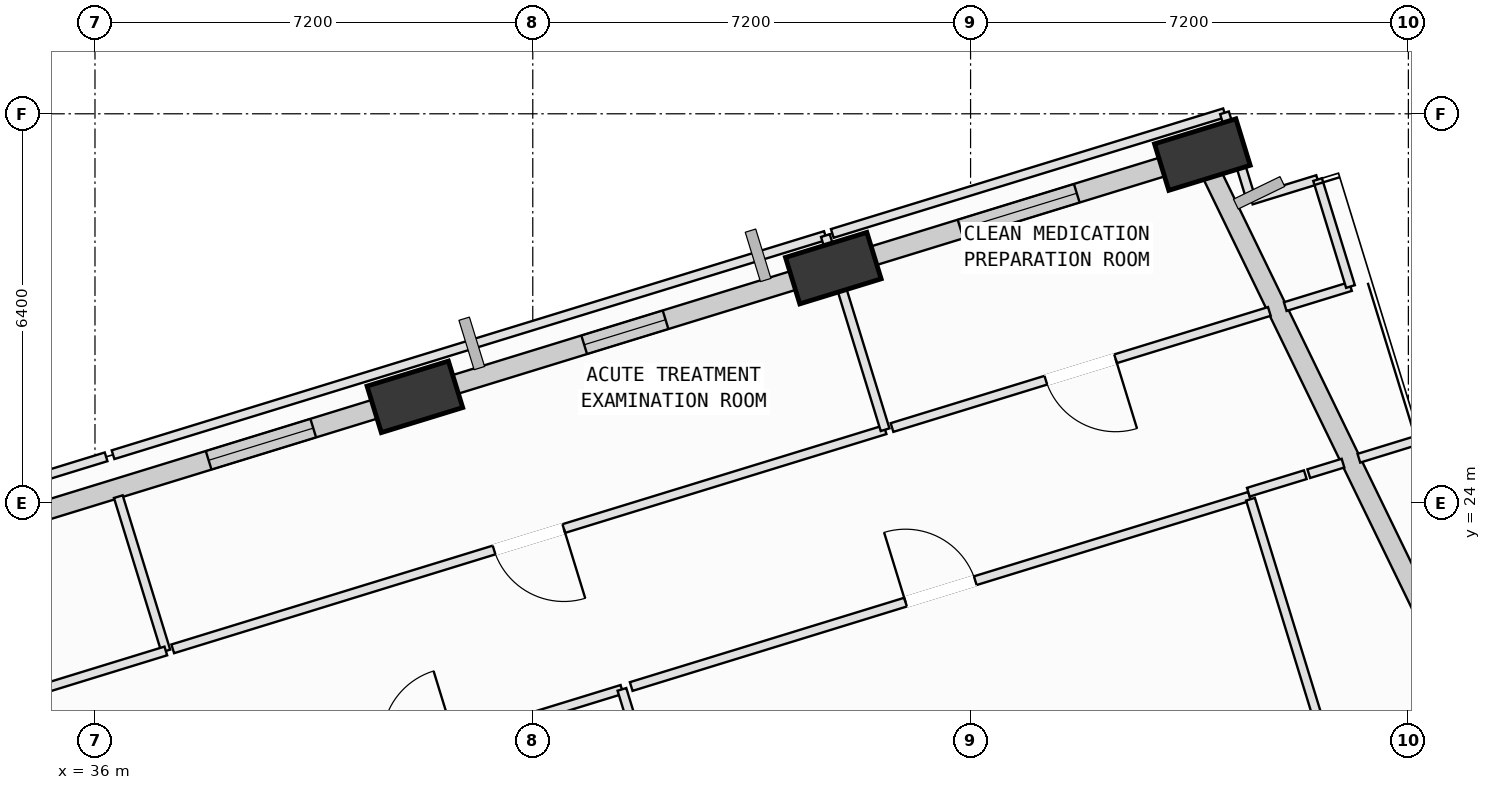
"""IFC4 building model, lengths in metres.
Left out: names, types, materials, properties, quantities, classifications, styles, units other than length and angle.
Written with IfcOpenShell. Run it as: python <this file> out.ifc"""

import sys

from ifc_helpers import new_model, si_unit, direction, frame, frame_2d, origin, origin_2d, place, context, subcontext, project, spatial, rectangle, extrude, element, fill, save


model = new_model("IFC4")
c1 = context("Model", 3, precision=1e-05, world=origin(), true_north=direction((0.0, 1.0)))
c2 = subcontext(c1, "Body", "Model", "MODEL_VIEW")
j1 = project(units=[si_unit("LENGTHUNIT", "METRE"), si_unit("PLANEANGLEUNIT", "RADIAN")], contexts=[c1])
p1 = place(None, origin())
s1 = spatial("IfcSite", under=j1, at=p1, CompositionType="ELEMENT")
p2 = place(p1, origin())
s2 = spatial("IfcBuilding", under=s1, at=p2, CompositionType="ELEMENT")
p3 = place(p2, frame((0.0, 0.0, 96.4)))
s3 = spatial("IfcBuildingStorey", under=s2, at=p3, CompositionType="ELEMENT", Elevation=96.4)
p4 = place(p3, frame((54.212, 29.729, 0.002), z_axis=(-0.021056394497, 0.084955857564, 0.996162200907), x_axis=(-0.857256251173, -0.514246403244, 0.025736289084)))
e1 = element("IfcColumn", 1, at=p4, inside=s3, PredefinedType="COLUMN", context=c2, shape_type="SweptSolid", body=[
    extrude(rectangle(XDim=1.4, YDim=0.8, at=origin_2d()), origin(), (0.0, 0.0, 1.0), 4.012),
])
p5 = place(p3, frame((48.143, 27.862, 0.002), z_axis=(-0.013170706194, 0.060060859267, 0.998107822674), x_axis=(-0.870744822712, -0.491402654713, 0.018079951933)))
e2 = element("IfcColumn", 2, at=p5, inside=s3, PredefinedType="COLUMN", context=c2, shape_type="SweptSolid", body=[
    extrude(rectangle(XDim=1.4, YDim=0.8, at=origin_2d()), origin(), (0.0, 0.0, 1.0), 4.004),
])
p6 = place(p3, frame((41.261, 25.744, 0.002), z_axis=(-0.004152063563, 0.031751074307, 0.999487183334), x_axis=(-0.909616782217, -0.415341613955, 0.009415584218)))
e3 = element("IfcColumn", 3, at=p6, inside=s3, PredefinedType="COLUMN", context=c2, shape_type="SweptSolid", body=[
    extrude(rectangle(XDim=1.4, YDim=0.8, at=origin_2d()), origin(), (0.0, 0.0, 1.0), 3.998),
])
p7 = place(p3, frame((54.353, 29.438, 0.0), z_axis=(0.0, 0.0, 1.0), x_axis=(0.436640831381, -0.899635917675, 0.0)))
e4 = element("IfcWall", 4, at=p7, inside=s3, PredefinedType="SOLIDWALL", context=c2, shape_type="SweptSolid", body=[
    extrude(rectangle(XDim=8.838, YDim=0.32, at=frame_2d((4.419, 0.0))), origin(), (0.0, 0.0, 1.0), 3.165),
])
p8 = place(p3, frame((48.612, 28.006, 0.0), z_axis=(0.0, 0.0, 1.0), x_axis=(0.955793658596, 0.294038232527, 0.0)))
e5 = element("IfcWall", 5, at=p8, inside=s3, PredefinedType="SOLIDWALL", context=c2, shape_type="SweptSolid", body=[
    extrude(rectangle(XDim=5.405, YDim=0.32, at=frame_2d((2.702, 0.0))), origin(), (0.0, 0.0, 1.0), 2.945),
])
p9 = place(p8, frame((1.698, 0.0, 0.75)))
e6 = element("IfcOpeningElement", 6, at=p9, cuts=e5, PredefinedType="OPENING", context=c2, shape_type="SweptSolid", body=[
    extrude(rectangle(XDim=2.0, YDim=1.95, at=frame_2d((1.0, 0.975))), frame((0.0, 0.17, 0.0), z_axis=(0.0, -1.0, 0.0), x_axis=(1.0, 0.0, 0.0)), (0.0, 0.0, 1.0), 0.34),
])
p10 = place(p3, frame((41.742, 25.892, 0.0), z_axis=(0.0, 0.0, 1.0), x_axis=(0.955782399792, 0.294074827635, 0.0)))
e7 = element("IfcWall", 7, at=p10, inside=s3, PredefinedType="SOLIDWALL", context=c2, shape_type="SweptSolid", body=[
    extrude(rectangle(XDim=6.227, YDim=0.32, at=frame_2d((3.113, 0.0))), origin(), (0.0, 0.0, 1.0), 3.145),
])
p11 = place(p10, frame((2.41, 0.0, 0.75)))
e8 = element("IfcOpeningElement", 8, at=p11, cuts=e7, PredefinedType="OPENING", context=c2, shape_type="SweptSolid", body=[
    extrude(rectangle(XDim=1.4, YDim=1.85, at=frame_2d((0.7, 0.925))), frame((0.0, 0.17, 0.0), z_axis=(0.0, -1.0, 0.0), x_axis=(1.0, 0.0, 0.0)), (0.0, 0.0, 1.0), 0.34),
])
p12 = place(p3, frame((34.864, 23.777, 0.0), z_axis=(0.0, 0.0, 1.0), x_axis=(0.955799403791, 0.294019556685, 0.0)))
e9 = element("IfcWall", 9, at=p12, inside=s3, PredefinedType="SOLIDWALL", context=c2, shape_type="SweptSolid", body=[
    extrude(rectangle(XDim=6.211, YDim=0.32, at=frame_2d((3.105, 0.0))), origin(), (0.0, 0.0, 1.0), 3.165),
])
p13 = place(p12, frame((3.144, 0.0, 0.75)))
e10 = element("IfcOpeningElement", 10, at=p13, cuts=e9, PredefinedType="OPENING", context=c2, shape_type="SweptSolid", body=[
    extrude(rectangle(XDim=1.8, YDim=2.05, at=frame_2d((0.9, 1.025))), frame((0.0, 0.17, 0.0), z_axis=(0.0, -1.0, 0.0), x_axis=(1.0, 0.0, 0.0)), (0.0, 0.0, 1.0), 0.34),
])
p14 = place(p3, frame((38.03, 18.891, 0.0), z_axis=(0.0, 0.0, 1.0), x_axis=(0.955772926222, 0.294105616236, 0.0)))
e11 = element("IfcWall", 11, at=p14, inside=s3, PredefinedType="PARTITIONING", context=c2, shape_type="SweptSolid", body=[
    extrude(rectangle(XDim=6.943, YDim=0.15, at=frame_2d((3.472, 0.0))), origin(), (0.0, 0.0, 1.0), 2.945),
])
p15 = place(p14, frame((2.872, 0.0, 0.0)))
e12 = element("IfcOpeningElement", 12, at=p15, cuts=e11, PredefinedType="OPENING", context=c2, shape_type="SweptSolid", body=[
    extrude(rectangle(XDim=1.2, YDim=2.15, at=frame_2d((0.6, 1.075))), frame((0.0, 0.085, 0.0), z_axis=(0.0, -1.0, 0.0), x_axis=(1.0, 0.0, 0.0)), (0.0, 0.0, 1.0), 0.17),
])
p16 = place(p3, frame((44.666, 20.933, 0.0), z_axis=(0.0, 0.0, 1.0), x_axis=(0.294050797953, -0.955789792906, 0.0)))
e13 = element("IfcWall", 13, at=p16, inside=s3, PredefinedType="PARTITIONING", context=c2, shape_type="SweptSolid", body=[
    extrude(rectangle(XDim=13.215, YDim=0.15, at=frame_2d((6.608, 0.0))), origin(), (0.0, 0.0, 1.0), 3.78),
])
p17 = place(p3, frame((44.819, 20.98, 0.0), z_axis=(0.0, 0.0, 1.0), x_axis=(0.955786946021, 0.294060051378, 0.0)))
e14 = element("IfcWall", 14, at=p17, inside=s3, PredefinedType="PARTITIONING", context=c2, shape_type="SweptSolid", body=[
    extrude(rectangle(XDim=10.64, YDim=0.15, at=frame_2d((5.32, 0.0))), origin(), (0.0, 0.0, 1.0), 3.78),
])
p18 = place(p17, frame((4.72, 0.0, 0.0)))
e15 = element("IfcOpeningElement", 15, at=p18, cuts=e14, PredefinedType="OPENING", context=c2, shape_type="SweptSolid", body=[
    extrude(rectangle(XDim=1.2, YDim=2.15, at=frame_2d((0.6, 1.075))), frame((0.0, 0.085, 0.0), z_axis=(0.0, -1.0, 0.0), x_axis=(1.0, 0.0, 0.0)), (0.0, 0.0, 1.0), 0.17),
])
p19 = place(p3, frame((55.004, 24.061, 0.0), z_axis=(0.0, 0.0, 1.0), x_axis=(0.294018711163, -0.955799663887, 0.0)))
e16 = element("IfcWall", 16, at=p19, inside=s3, PredefinedType="PARTITIONING", context=c2, shape_type="SweptSolid", body=[
    extrude(rectangle(XDim=13.799, YDim=0.15, at=frame_2d((6.899, 0.0))), origin(), (0.0, 0.0, 1.0), 3.78),
])
p20 = place(p3, frame((36.384, 24.103, 0.0), z_axis=(0.0, 0.0, 1.0), x_axis=(0.294105230009, -0.955773045069, 0.0)))
e17 = element("IfcWall", 17, at=p20, inside=s3, PredefinedType="PARTITIONING", context=c2, shape_type="SweptSolid", body=[
    extrude(rectangle(XDim=2.656, YDim=0.15, at=frame_2d((1.328, 0.0))), origin(), (0.0, 0.0, 1.0), 3.78),
])
p21 = place(p3, frame((37.165, 21.565, 0.0), z_axis=(0.0, 0.0, 1.0), x_axis=(-0.955838846993, -0.293891304022, 0.0)))
e18 = element("IfcWall", 18, at=p21, inside=s3, PredefinedType="PARTITIONING", context=c2, shape_type="SweptSolid", body=[
    extrude(rectangle(XDim=3.351, YDim=0.15, at=frame_2d((1.676, 0.0))), origin(), (0.0, 0.0, 1.0), 3.78),
])
p22 = place(p3, frame((28.1, 22.271, 0.0), z_axis=(0.0, 0.0, 1.0), x_axis=(0.955779632904, 0.294083820237, 0.0)))
e19 = element("IfcWall", 19, at=p22, inside=s3, PredefinedType="PARTITIONING", context=c2, shape_type="SweptSolid", body=[
    extrude(rectangle(XDim=8.457, YDim=0.15, at=frame_2d((4.229, 0.0))), origin(), (0.0, 0.0, 1.0), 3.78),
])
p23 = place(p3, frame((48.994, 25.204, 0.0), z_axis=(0.0, 0.0, 1.0), x_axis=(-0.955791928213, -0.294043857208, 0.0)))
e20 = element("IfcWall", 20, at=p23, inside=s3, PredefinedType="PARTITIONING", context=c2, shape_type="SweptSolid", body=[
    extrude(rectangle(XDim=12.257, YDim=0.15, at=frame_2d((6.128, 0.0))), origin(), (0.0, 0.0, 1.0), 2.945),
])
p24 = place(p23, frame((5.528, 0.0, 0.0)))
e21 = element("IfcOpeningElement", 21, at=p24, cuts=e20, PredefinedType="OPENING", context=c2, shape_type="SweptSolid", body=[
    extrude(rectangle(XDim=1.2, YDim=2.15, at=frame_2d((0.6, 1.075))), frame((0.0, 0.085, 0.0), z_axis=(0.0, -1.0, 0.0), x_axis=(1.0, 0.0, 0.0)), (0.0, 0.0, 1.0), 0.17),
])
p25 = place(p3, frame((36.297, 24.793, 0.0), z_axis=(0.0, 0.0, 1.0), x_axis=(0.955791928213, 0.294043857208, 0.0)))
e22 = element("IfcWall", 22, at=p25, inside=s3, PredefinedType="PARTITIONING", context=c2, shape_type="SweptSolid", body=[
    extrude(rectangle(XDim=12.257, YDim=0.15, at=frame_2d((6.128, 0.0))), origin(), (0.0, 0.0, 1.0), 3.145),
])
p26 = place(p3, frame((48.012, 28.397, 0.0), z_axis=(0.0, 0.0, 1.0), x_axis=(0.293952315678, -0.955820085637, 0.0)))
e23 = element("IfcWall", 23, at=p26, inside=s3, PredefinedType="PARTITIONING", context=c2, shape_type="SweptSolid", body=[
    extrude(rectangle(XDim=3.34, YDim=0.15, at=frame_2d((1.67, 0.0))), origin(), (0.0, 0.0, 1.0), 3.78),
])
p27 = place(p3, frame((56.648, 27.559, 0.0), z_axis=(0.0, 0.0, 1.0), x_axis=(-0.955797815321, -0.294024720436, 0.0)))
e24 = element("IfcWall", 24, at=p27, inside=s3, PredefinedType="PARTITIONING", context=c2, shape_type="SweptSolid", body=[
    extrude(rectangle(XDim=1.123, YDim=0.15, at=frame_2d((0.561, 0.0))), origin(), (0.0, 0.0, 1.0), 3.78),
])
p28 = place(p3, frame((55.314, 27.149, 0.0), z_axis=(0.0, 0.0, 1.0), x_axis=(-0.955805833241, -0.293998655001, 0.0)))
e25 = element("IfcWall", 25, at=p28, inside=s3, PredefinedType="PARTITIONING", context=c2, shape_type="SweptSolid", body=[
    extrude(rectangle(XDim=6.493, YDim=0.15, at=frame_2d((3.247, 0.0))), origin(), (0.0, 0.0, 1.0), 3.78),
])
p29 = place(p28, frame((2.646, 0.0, 0.0)))
e26 = element("IfcOpeningElement", 26, at=p29, cuts=e25, PredefinedType="OPENING", context=c2, shape_type="SweptSolid", body=[
    extrude(rectangle(XDim=1.2, YDim=2.15, at=frame_2d((0.6, 1.075))), frame((0.0, 0.085, 0.0), z_axis=(0.0, -1.0, 0.0), x_axis=(1.0, 0.0, 0.0)), (0.0, 0.0, 1.0), 0.17),
])
p30 = place(p3, frame((48.126, 28.432, 0.0), z_axis=(0.0, 0.0, 1.0), x_axis=(0.95579856253, 0.294022291445, 0.0)))
e27 = element("IfcWall", 27, at=p30, inside=s3, PredefinedType="PARTITIONING", context=c2, shape_type="SweptSolid", body=[
    extrude(rectangle(XDim=6.748, YDim=0.15, at=frame_2d((3.374, 0.0))), origin(), (0.0, 0.0, 1.0), 2.945),
])
p31 = place(p3, frame((54.576, 30.416, 0.0), z_axis=(0.0, 0.0, 1.0), x_axis=(0.294028677657, -0.955796597983, 0.0)))
e28 = element("IfcWall", 28, at=p31, inside=s3, PredefinedType="PARTITIONING", context=c2, shape_type="SweptSolid", body=[
    extrude(rectangle(XDim=1.5, YDim=0.15, at=frame_2d((0.75, 0.0))), origin(), (0.0, 0.0, 1.0), 3.165),
])
p32 = place(p3, frame((55.017, 28.982, 0.0), z_axis=(0.0, 0.0, 1.0), x_axis=(0.955570492983, 0.294762672231, 0.0)))
e29 = element("IfcWall", 29, at=p32, inside=s3, PredefinedType="PARTITIONING", context=c2, shape_type="SweptSolid", body=[
    extrude(rectangle(XDim=1.141, YDim=0.15, at=frame_2d((0.57, 0.0))), origin(), (0.0, 0.0, 1.0), 3.78),
])
p33 = place(p3, frame((56.107, 29.318, 0.0), z_axis=(0.0, 0.0, 1.0), x_axis=(0.293973982394, -0.955813422, 0.0)))
e30 = element("IfcWall", 30, at=p33, inside=s3, PredefinedType="PARTITIONING", context=c2, shape_type="SweptSolid", body=[
    extrude(rectangle(XDim=1.84, YDim=0.15, at=frame_2d((0.92, 0.0))), origin(), (0.0, 0.0, 1.0), 3.78),
])
p34 = place(p3, frame((54.968, 24.176, 0.0), z_axis=(0.0, 0.0, 1.0), x_axis=(0.955843603332, 0.293875834271, 0.0)))
e31 = element("IfcWall", 31, at=p34, inside=s3, PredefinedType="PARTITIONING", context=c2, shape_type="SweptSolid", body=[
    extrude(rectangle(XDim=0.98, YDim=0.15, at=frame_2d((0.49, 0.0))), origin(), (0.0, 0.0, 1.0), 3.78),
])
p35 = place(p3, frame((55.962, 24.481, 0.0), z_axis=(0.0, 0.0, 1.0), x_axis=(0.95584172242, 0.29388195195, 0.0)))
e32 = element("IfcWall", 32, at=p35, inside=s3, PredefinedType="PARTITIONING", context=c2, shape_type="SweptSolid", body=[
    extrude(rectangle(XDim=0.589, YDim=0.15, at=frame_2d((0.294, 0.0))), origin(), (0.0, 0.0, 1.0), 3.78),
])
p36 = place(p3, frame((56.786, 24.735, 0.0), z_axis=(0.0, 0.0, 1.0), x_axis=(0.955873764291, 0.293777716548, 0.0)))
e33 = element("IfcWall", 33, at=p36, inside=s3, PredefinedType="PARTITIONING", context=c2, shape_type="SweptSolid", body=[
    extrude(rectangle(XDim=1.058, YDim=0.15, at=frame_2d((0.529, 0.0))), origin(), (0.0, 0.0, 1.0), 3.78),
])
p37 = place(p9, origin())
e34 = element("IfcWindow", 34, at=p37, inside=s3, PartitioningType="SINGLE_PANEL", PredefinedType="WINDOW", context=c2, shape_type="SweptSolid", body=[
    extrude(rectangle(XDim=2.0, YDim=1.95, at=frame_2d((1.0, 0.975))), frame((0.0, 0.03, 0.0), z_axis=(0.0, -1.0, 0.0), x_axis=(1.0, 0.0, 0.0)), (0.0, 0.0, 1.0), 0.06),
])
fill(e6, e34)
p38 = place(p11, origin())
e35 = element("IfcWindow", 35, at=p38, inside=s3, PartitioningType="SINGLE_PANEL", PredefinedType="WINDOW", context=c2, shape_type="SweptSolid", body=[
    extrude(rectangle(XDim=1.4, YDim=1.85, at=frame_2d((0.7, 0.925))), frame((0.0, 0.03, 0.0), z_axis=(0.0, -1.0, 0.0), x_axis=(1.0, 0.0, 0.0)), (0.0, 0.0, 1.0), 0.06),
])
fill(e8, e35)
p39 = place(p13, origin())
e36 = element("IfcWindow", 36, at=p39, inside=s3, PartitioningType="SINGLE_PANEL", PredefinedType="WINDOW", context=c2, shape_type="SweptSolid", body=[
    extrude(rectangle(XDim=1.8, YDim=2.05, at=frame_2d((0.9, 1.025))), frame((0.0, 0.03, 0.0), z_axis=(0.0, -1.0, 0.0), x_axis=(1.0, 0.0, 0.0)), (0.0, 0.0, 1.0), 0.06),
])
fill(e10, e36)
p40 = place(p18, origin())
e37 = element("IfcDoor", 37, at=p40, inside=s3, OperationType="SINGLE_SWING_LEFT", PredefinedType="DOOR", context=c2, shape_type="SweptSolid", body=[
    extrude(rectangle(XDim=1.2, YDim=2.15, at=frame_2d((0.6, 1.075))), frame((0.0, 0.025, 0.0), z_axis=(0.0, -1.0, 0.0), x_axis=(1.0, 0.0, 0.0)), (0.0, 0.0, 1.0), 0.05),
])
fill(e15, e37)
p41 = place(p24, origin())
e38 = element("IfcDoor", 38, at=p41, inside=s3, OperationType="SINGLE_SWING_LEFT", PredefinedType="DOOR", context=c2, shape_type="SweptSolid", body=[
    extrude(rectangle(XDim=1.2, YDim=2.15, at=frame_2d((0.6, 1.075))), frame((0.0, 0.025, 0.0), z_axis=(0.0, -1.0, 0.0), x_axis=(1.0, 0.0, 0.0)), (0.0, 0.0, 1.0), 0.05),
])
fill(e21, e38)
p42 = place(p29, origin())
e39 = element("IfcDoor", 39, at=p42, inside=s3, OperationType="SINGLE_SWING_LEFT", PredefinedType="DOOR", context=c2, shape_type="SweptSolid", body=[
    extrude(rectangle(XDim=1.2, YDim=2.15, at=frame_2d((0.6, 1.075))), frame((0.0, 0.025, 0.0), z_axis=(0.0, -1.0, 0.0), x_axis=(1.0, 0.0, 0.0)), (0.0, 0.0, 1.0), 0.05),
])
fill(e26, e39)
save(model, sys.argv[1])
